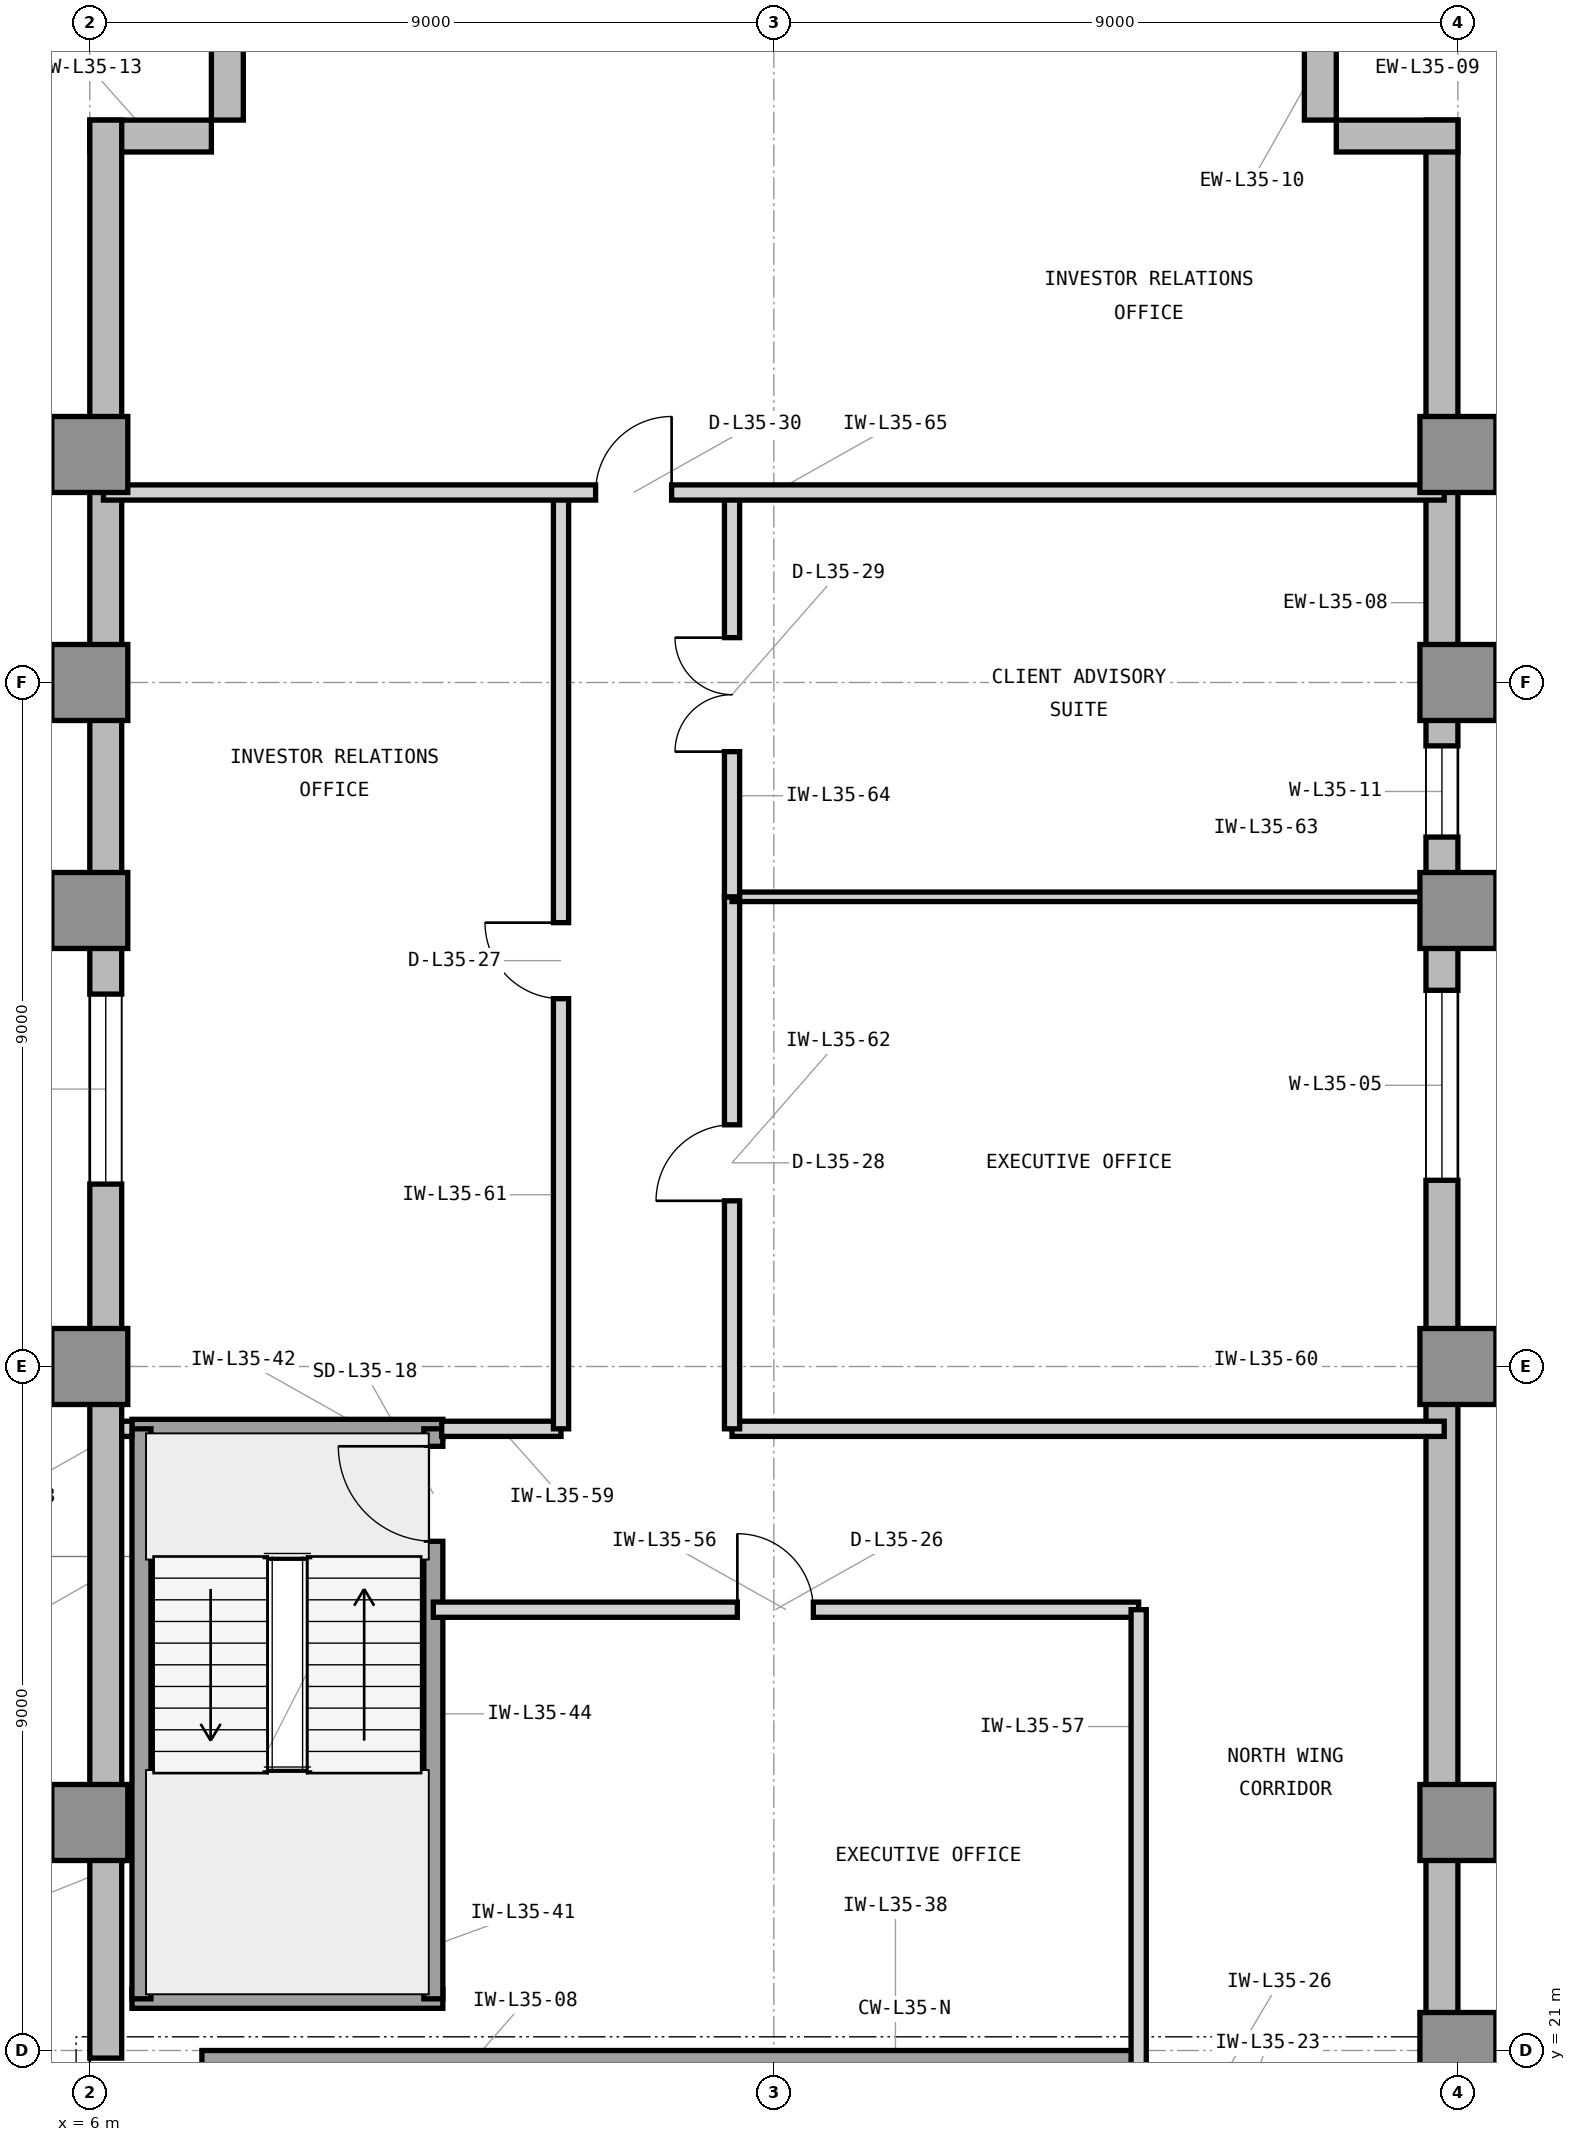
"""IFC4 building model, lengths in metres.
Left out: names, types, materials, properties, quantities, classifications, styles, units other than length and angle.
Written with IfcOpenShell. Run it as: python <this file> out.ifc"""

import sys

from ifc_helpers import new_model, si_unit, direction, frame, frame_2d, origin, origin_2d, place, context, subcontext, project, spatial, rectangle, extrude, element, fill, save


model = new_model("IFC4")
c1 = context("Model", 3, precision=1e-05, world=origin(), true_north=direction((0.0, 1.0)))
c2 = subcontext(c1, "Body", "Model", "MODEL_VIEW")
j1 = project(units=[si_unit("LENGTHUNIT", "METRE"), si_unit("PLANEANGLEUNIT", "RADIAN")], contexts=[c1])
p1 = place(None, origin())
s1 = spatial("IfcSite", under=j1, at=p1, CompositionType="ELEMENT")
p2 = place(p1, origin())
s2 = spatial("IfcBuilding", under=s1, at=p2, CompositionType="ELEMENT")
p3 = place(p2, frame((0.0, 0.0, 147.9)))
s3 = spatial("IfcBuildingStorey", under=s2, at=p3, CompositionType="ELEMENT", Elevation=147.9)
p4 = place(p3, frame((7.475, 20.65, 0.0), z_axis=(0.0, 0.0, 1.0), x_axis=(1.0, 0.0, 0.0)))
e1 = element("IfcWall", 1, at=p4, inside=s3, PredefinedType="SHEAR", context=c2, shape_type="SweptSolid", body=[
    extrude(rectangle(XDim=12.325, YDim=0.7, at=frame_2d((6.163, 0.0))), origin(), (0.0, 0.0, 1.0), 3.9),
])
for number, where, z_axis, x_axis in (
    (2, (24.0, 21.0, 0.0), (0.0, 0.0, 1.0), (1.0, 0.0, 0.0)),
    (3, (6.0, 24.0, 0.0), (0.0, 0.0, 1.0), (1.0, 0.0, 0.0)),
    (4, (24.0, 24.0, 0.0), (0.0, 0.0, 1.0), (1.0, 0.0, 0.0)),
    (5, (6.0, 30.0, 0.0), (0.0, 0.0, 1.0), (1.0, 0.0, 0.0)),
    (6, (24.0, 30.0, 0.0), (0.0, 0.0, 1.0), (1.0, 0.0, 0.0)),
    (7, (6.0, 36.0, 0.0), (0.0, 0.0, 1.0), (1.0, 0.0, 0.0)),
    (8, (24.0, 36.0, 0.0), (0.0, 0.0, 1.0), (1.0, 0.0, 0.0)),
    (9, (6.0, 39.0, 0.0), (0.0, 0.0, 1.0), (1.0, 0.0, 0.0)),
    (10, (24.0, 39.0, 0.0), (0.0, 0.0, 1.0), (1.0, 0.0, 0.0)),
    (11, (6.0, 42.0, 0.0), (0.0, 0.0, 1.0), (1.0, 0.0, 0.0)),
    (12, (24.0, 42.0, 0.0), (0.0, 0.0, 1.0), (1.0, 0.0, 0.0)),
):
    element("IfcColumn", number, at=place(p3, frame(where, z_axis=z_axis, x_axis=x_axis)), inside=s3, PredefinedType="COLUMN", context=c2, shape_type="SweptSolid", body=[
        extrude(rectangle(XDim=1.0, YDim=1.0, at=origin_2d()), origin(), (0.0, 0.0, 1.0), 3.9),
    ])
p5 = place(p3, frame((58.4, 20.79, 0.0), z_axis=(0.0, 0.0, 1.0), x_axis=(-1.0, 0.0, 0.0)))
e13 = element("IfcWall", 13, at=p5, inside=s3, PredefinedType="STANDARD", context=c2, shape_type="SweptSolid", body=[
    extrude(rectangle(XDim=34.4, YDim=0.42, at=frame_2d((17.2, 0.0))), origin(), (0.0, 0.0, 1.0), 3.7),
])
p6 = place(p5, frame((20.864, 0.0, 0.85)))
e14 = element("IfcOpeningElement", 14, at=p6, cuts=e13, PredefinedType="OPENING", context=c2, shape_type="SweptSolid", body=[
    extrude(rectangle(XDim=2.5, YDim=2.25, at=frame_2d((1.25, 1.125))), frame((0.0, 0.22, 0.0), z_axis=(0.0, -1.0, 0.0), x_axis=(1.0, 0.0, 0.0)), (0.0, 0.0, 1.0), 0.44),
])
p7 = place(p5, frame((32.222, 0.0, 0.85)))
e15 = element("IfcOpeningElement", 15, at=p7, cuts=e13, PredefinedType="OPENING", context=c2, shape_type="SweptSolid", body=[
    extrude(rectangle(XDim=1.2, YDim=2.25, at=frame_2d((0.6, 1.125))), frame((0.0, 0.22, 0.0), z_axis=(0.0, -1.0, 0.0), x_axis=(1.0, 0.0, 0.0)), (0.0, 0.0, 1.0), 0.44),
])
p8 = place(p5, frame((11.386, 0.0, 0.85)))
e16 = element("IfcOpeningElement", 16, at=p8, cuts=e13, PredefinedType="OPENING", context=c2, shape_type="SweptSolid", body=[
    extrude(rectangle(XDim=2.5, YDim=2.25, at=frame_2d((1.25, 1.125))), frame((0.0, 0.22, 0.0), z_axis=(0.0, -1.0, 0.0), x_axis=(1.0, 0.0, 0.0)), (0.0, 0.0, 1.0), 0.44),
])
p9 = place(p3, frame((23.79, 21.0, 0.0), z_axis=(0.0, 0.0, 1.0), x_axis=(0.0, 1.0, 0.0)))
e17 = element("IfcWall", 17, at=p9, inside=s3, PredefinedType="STANDARD", context=c2, shape_type="SweptSolid", body=[
    extrude(rectangle(XDim=25.4, YDim=0.42, at=frame_2d((12.7, 0.0))), origin(), (0.0, 0.0, 1.0), 3.7),
])
p10 = place(p9, frame((11.45, 0.0, 0.85)))
e18 = element("IfcOpeningElement", 18, at=p10, cuts=e17, PredefinedType="OPENING", context=c2, shape_type="SweptSolid", body=[
    extrude(rectangle(XDim=2.5, YDim=2.25, at=frame_2d((1.25, 1.125))), frame((0.0, 0.22, 0.0), z_axis=(0.0, -1.0, 0.0), x_axis=(1.0, 0.0, 0.0)), (0.0, 0.0, 1.0), 0.44),
])
p11 = place(p9, frame((15.966, 0.0, 0.85)))
e19 = element("IfcOpeningElement", 19, at=p11, cuts=e17, PredefinedType="OPENING", context=c2, shape_type="SweptSolid", body=[
    extrude(rectangle(XDim=1.2, YDim=2.25, at=frame_2d((0.6, 1.125))), frame((0.0, 0.22, 0.0), z_axis=(0.0, -1.0, 0.0), x_axis=(1.0, 0.0, 0.0)), (0.0, 0.0, 1.0), 0.44),
])
for number, where, z_axis, x_axis in (
    (20, (24.0, 46.19, 0.0), (0.0, 0.0, 1.0), (-1.0, 0.0, 0.0)),
    (21, (22.19, 46.4, 0.0), (0.0, 0.0, 1.0), (0.0, 1.0, 0.0)),
    (22, (7.81, 48.0, 0.0), (0.0, 0.0, 1.0), (0.0, -1.0, 0.0)),
    (23, (7.6, 46.19, 0.0), (0.0, 0.0, 1.0), (-1.0, 0.0, 0.0)),
):
    element("IfcWall", number, at=place(p3, frame(where, z_axis=z_axis, x_axis=x_axis)), inside=s3, PredefinedType="STANDARD", context=c2, shape_type="SweptSolid", body=[
        extrude(rectangle(XDim=1.6, YDim=0.42, at=frame_2d((0.8, 0.0))), origin(), (0.0, 0.0, 1.0), 3.7),
    ])
p12 = place(p3, frame((6.21, 46.4, 0.0), z_axis=(0.0, 0.0, 1.0), x_axis=(0.0, -1.0, 0.0)))
e24 = element("IfcWall", 24, at=p12, inside=s3, PredefinedType="STANDARD", context=c2, shape_type="SweptSolid", body=[
    extrude(rectangle(XDim=25.5, YDim=0.42, at=frame_2d((12.75, 0.0))), origin(), (0.0, 0.0, 1.0), 3.7),
])
p13 = place(p12, frame((11.5, 0.0, 0.85)))
e25 = element("IfcOpeningElement", 25, at=p13, cuts=e24, PredefinedType="OPENING", context=c2, shape_type="SweptSolid", body=[
    extrude(rectangle(XDim=2.5, YDim=2.25, at=frame_2d((1.25, 1.125))), frame((0.0, 0.22, 0.0), z_axis=(0.0, -1.0, 0.0), x_axis=(1.0, 0.0, 0.0)), (0.0, 0.0, 1.0), 0.44),
])
for number, where, z_axis, x_axis in (
    (26, (6.555, 21.68, 0.0), (0.0, 0.0, 1.0), (1.0, 0.0, 0.0)),
    (27, (6.555, 29.18, 0.0), (0.0, 0.0, 1.0), (1.0, 0.0, 0.0)),
):
    element("IfcWall", number, at=place(p3, frame(where, z_axis=z_axis, x_axis=x_axis)), inside=s3, PredefinedType="SHEAR", context=c2, shape_type="SweptSolid", body=[
        extrude(rectangle(XDim=4.09, YDim=0.25, at=frame_2d((2.045, 0.0))), origin(), (0.0, 0.0, 1.0), 3.9),
    ])
p14 = place(p3, frame((6.68, 21.68, 0.0), z_axis=(0.0, 0.0, 1.0), x_axis=(0.0, 1.0, 0.0)))
e28 = element("IfcWall", 28, at=p14, inside=s3, PredefinedType="SHEAR", context=c2, shape_type="SweptSolid", body=[
    extrude(rectangle(XDim=7.5, YDim=0.25, at=frame_2d((3.75, 0.0))), origin(), (0.0, 0.0, 1.0), 3.9),
])
p15 = place(p3, frame((10.52, 21.68, 0.0), z_axis=(0.0, 0.0, 1.0), x_axis=(0.0, 1.0, 0.0)))
e29 = element("IfcWall", 29, at=p15, inside=s3, PredefinedType="SHEAR", context=c2, shape_type="SweptSolid", body=[
    extrude(rectangle(XDim=7.5, YDim=0.25, at=frame_2d((3.75, 0.0))), origin(), (0.0, 0.0, 1.0), 3.9),
])
p16 = place(p15, frame((6.02, 0.0, 0.0)))
e30 = element("IfcOpeningElement", 30, at=p16, cuts=e29, PredefinedType="OPENING", context=c2, shape_type="SweptSolid", body=[
    extrude(rectangle(XDim=1.25, YDim=2.2, at=frame_2d((0.625, 1.1))), frame((0.0, 0.135, 0.0), z_axis=(0.0, -1.0, 0.0), x_axis=(1.0, 0.0, 0.0)), (0.0, 0.0, 1.0), 0.27),
])
p17 = place(p3, frame((10.52, 26.8, 0.0), z_axis=(0.0, 0.0, 1.0), x_axis=(1.0, 0.0, 0.0)))
e31 = element("IfcWall", 31, at=p17, inside=s3, PredefinedType="PARTITIONING", context=c2, shape_type="SweptSolid", body=[
    extrude(rectangle(XDim=9.28, YDim=0.2, at=frame_2d((4.64, 0.0))), origin(), (0.0, 0.0, 1.0), 3.69),
])
p18 = place(p17, frame((4.0, 0.0, 0.0)))
e32 = element("IfcOpeningElement", 32, at=p18, cuts=e31, PredefinedType="OPENING", context=c2, shape_type="SweptSolid", body=[
    extrude(rectangle(XDim=1.0, YDim=2.15, at=frame_2d((0.5, 1.075))), frame((0.0, 0.11, 0.0), z_axis=(0.0, -1.0, 0.0), x_axis=(1.0, 0.0, 0.0)), (0.0, 0.0, 1.0), 0.22),
])
p19 = place(p3, frame((19.8, 20.65, 0.0), z_axis=(0.0, 0.0, 1.0), x_axis=(0.0, 1.0, 0.0)))
e33 = element("IfcWall", 33, at=p19, inside=s3, PredefinedType="PARTITIONING", context=c2, shape_type="SweptSolid", body=[
    extrude(rectangle(XDim=6.15, YDim=0.2, at=frame_2d((3.075, 0.0))), origin(), (0.0, 0.0, 1.0), 3.69),
])
p20 = place(p3, frame((6.42, 29.18, 0.0), z_axis=(0.0, 0.0, 1.0), x_axis=(1.0, 0.0, 0.0)))
e34 = element("IfcWall", 34, at=p20, inside=s3, PredefinedType="PARTITIONING", context=c2, shape_type="SweptSolid", body=[
    extrude(rectangle(XDim=0.135, YDim=0.2, at=frame_2d((0.067, 0.0))), origin(), (0.0, 0.0, 1.0), 3.69),
])
p21 = place(p3, frame((10.63, 29.18, 0.0), z_axis=(0.0, 0.0, 1.0), x_axis=(1.0, 0.0, 0.0)))
e35 = element("IfcWall", 35, at=p21, inside=s3, PredefinedType="PARTITIONING", context=c2, shape_type="SweptSolid", body=[
    extrude(rectangle(XDim=1.57, YDim=0.2, at=frame_2d((0.785, 0.0))), origin(), (0.0, 0.0, 1.0), 3.69),
])
p22 = place(p3, frame((14.45, 29.18, 0.0), z_axis=(0.0, 0.0, 1.0), x_axis=(1.0, 0.0, 0.0)))
e36 = element("IfcWall", 36, at=p22, inside=s3, PredefinedType="PARTITIONING", context=c2, shape_type="SweptSolid", body=[
    extrude(rectangle(XDim=9.37, YDim=0.2, at=frame_2d((4.685, 0.0))), origin(), (0.0, 0.0, 1.0), 3.69),
])
p23 = place(p3, frame((12.2, 29.18, 0.0), z_axis=(0.0, 0.0, 1.0), x_axis=(0.0, 1.0, 0.0)))
e37 = element("IfcWall", 37, at=p23, inside=s3, PredefinedType="PARTITIONING", context=c2, shape_type="SweptSolid", body=[
    extrude(rectangle(XDim=12.32, YDim=0.2, at=frame_2d((6.16, 0.0))), origin(), (0.0, 0.0, 1.0), 3.69),
])
p24 = place(p23, frame((5.66, 0.0, 0.0)))
e38 = element("IfcOpeningElement", 38, at=p24, cuts=e37, PredefinedType="OPENING", context=c2, shape_type="SweptSolid", body=[
    extrude(rectangle(XDim=1.0, YDim=2.15, at=frame_2d((0.5, 1.075))), frame((0.0, 0.11, 0.0), z_axis=(0.0, -1.0, 0.0), x_axis=(1.0, 0.0, 0.0)), (0.0, 0.0, 1.0), 0.22),
])
p25 = place(p3, frame((14.45, 29.18, 0.0), z_axis=(0.0, 0.0, 1.0), x_axis=(0.0, 1.0, 0.0)))
e39 = element("IfcWall", 39, at=p25, inside=s3, PredefinedType="PARTITIONING", context=c2, shape_type="SweptSolid", body=[
    extrude(rectangle(XDim=7.0, YDim=0.2, at=frame_2d((3.5, 0.0))), origin(), (0.0, 0.0, 1.0), 3.69),
])
p26 = place(p25, frame((3.0, 0.0, 0.0)))
e40 = element("IfcOpeningElement", 40, at=p26, cuts=e39, PredefinedType="OPENING", context=c2, shape_type="SweptSolid", body=[
    extrude(rectangle(XDim=1.0, YDim=2.15, at=frame_2d((0.5, 1.075))), frame((0.0, 0.11, 0.0), z_axis=(0.0, -1.0, 0.0), x_axis=(1.0, 0.0, 0.0)), (0.0, 0.0, 1.0), 0.22),
])
p27 = place(p3, frame((14.45, 36.18, 0.0), z_axis=(0.0, 0.0, 1.0), x_axis=(1.0, 0.0, 0.0)))
e41 = element("IfcWall", 41, at=p27, inside=s3, PredefinedType="PARTITIONING", context=c2, shape_type="SweptSolid", body=[
    extrude(rectangle(XDim=9.37, YDim=0.125, at=frame_2d((4.685, 0.0))), origin(), (0.0, 0.0, 1.0), 3.69),
])
p28 = place(p3, frame((14.45, 36.18, 0.0), z_axis=(0.0, 0.0, 1.0), x_axis=(0.0, 1.0, 0.0)))
e42 = element("IfcWall", 42, at=p28, inside=s3, PredefinedType="PARTITIONING", context=c2, shape_type="SweptSolid", body=[
    extrude(rectangle(XDim=5.32, YDim=0.2, at=frame_2d((2.66, 0.0))), origin(), (0.0, 0.0, 1.0), 3.69),
])
p29 = place(p28, frame((1.91, 0.0, 0.0)))
e43 = element("IfcOpeningElement", 43, at=p29, cuts=e42, PredefinedType="OPENING", context=c2, shape_type="SweptSolid", body=[
    extrude(rectangle(XDim=1.5, YDim=2.3, at=frame_2d((0.75, 1.15))), frame((0.0, 0.11, 0.0), z_axis=(0.0, -1.0, 0.0), x_axis=(1.0, 0.0, 0.0)), (0.0, 0.0, 1.0), 0.22),
])
p30 = place(p3, frame((6.18, 41.5, 0.0), z_axis=(0.0, 0.0, 1.0), x_axis=(1.0, 0.0, 0.0)))
e44 = element("IfcWall", 44, at=p30, inside=s3, PredefinedType="PARTITIONING", context=c2, shape_type="SweptSolid", body=[
    extrude(rectangle(XDim=17.64, YDim=0.2, at=frame_2d((8.82, 0.0))), origin(), (0.0, 0.0, 1.0), 3.69),
])
p31 = place(p30, frame((6.475, 0.0, 0.0)))
e45 = element("IfcOpeningElement", 45, at=p31, cuts=e44, PredefinedType="OPENING", context=c2, shape_type="SweptSolid", body=[
    extrude(rectangle(XDim=1.0, YDim=2.15, at=frame_2d((0.5, 1.075))), frame((0.0, 0.11, 0.0), z_axis=(0.0, -1.0, 0.0), x_axis=(1.0, 0.0, 0.0)), (0.0, 0.0, 1.0), 0.22),
])
p32 = place(p10, origin())
e46 = element("IfcWindow", 46, at=p32, inside=s3, PartitioningType="SINGLE_PANEL", PredefinedType="WINDOW", context=c2, shape_type="SweptSolid", body=[
    extrude(rectangle(XDim=2.5, YDim=2.25, at=frame_2d((1.25, 1.125))), frame((0.0, 0.11, 0.0), z_axis=(0.0, -1.0, 0.0), x_axis=(1.0, 0.0, 0.0)), (0.0, 0.0, 1.0), 0.06),
])
fill(e18, e46)
p33 = place(p13, origin())
e47 = element("IfcWindow", 47, at=p33, inside=s3, PartitioningType="SINGLE_PANEL", PredefinedType="WINDOW", context=c2, shape_type="SweptSolid", body=[
    extrude(rectangle(XDim=2.5, YDim=2.25, at=frame_2d((1.25, 1.125))), frame((0.0, 0.11, 0.0), z_axis=(0.0, -1.0, 0.0), x_axis=(1.0, 0.0, 0.0)), (0.0, 0.0, 1.0), 0.06),
])
fill(e25, e47)
p34 = place(p16, origin())
e48 = element("IfcDoor", 48, at=p34, inside=s3, OperationType="SINGLE_SWING_RIGHT", PredefinedType="DOOR", context=c2, shape_type="SweptSolid", body=[
    extrude(rectangle(XDim=1.25, YDim=2.2, at=frame_2d((0.625, 1.1))), frame((0.0, 0.025, 0.0), z_axis=(0.0, -1.0, 0.0), x_axis=(1.0, 0.0, 0.0)), (0.0, 0.0, 1.0), 0.05),
])
fill(e30, e48)
p35 = place(p18, origin())
e49 = element("IfcDoor", 49, at=p35, inside=s3, OperationType="SINGLE_SWING_LEFT", PredefinedType="DOOR", context=c2, shape_type="SweptSolid", body=[
    extrude(rectangle(XDim=1.0, YDim=2.15, at=frame_2d((0.5, 1.075))), frame((0.0, 0.025, 0.0), z_axis=(0.0, -1.0, 0.0), x_axis=(1.0, 0.0, 0.0)), (0.0, 0.0, 1.0), 0.05),
])
fill(e32, e49)
p36 = place(p24, origin())
e50 = element("IfcDoor", 50, at=p36, inside=s3, OperationType="SINGLE_SWING_RIGHT", PredefinedType="DOOR", context=c2, shape_type="SweptSolid", body=[
    extrude(rectangle(XDim=1.0, YDim=2.15, at=frame_2d((0.5, 1.075))), frame((0.0, 0.025, 0.0), z_axis=(0.0, -1.0, 0.0), x_axis=(1.0, 0.0, 0.0)), (0.0, 0.0, 1.0), 0.05),
])
fill(e38, e50)
p37 = place(p26, origin())
e51 = element("IfcDoor", 51, at=p37, inside=s3, OperationType="SINGLE_SWING_LEFT", PredefinedType="DOOR", context=c2, shape_type="SweptSolid", body=[
    extrude(rectangle(XDim=1.0, YDim=2.15, at=frame_2d((0.5, 1.075))), frame((0.0, 0.025, 0.0), z_axis=(0.0, -1.0, 0.0), x_axis=(1.0, 0.0, 0.0)), (0.0, 0.0, 1.0), 0.05),
])
fill(e40, e51)
p38 = place(p29, origin())
e52 = element("IfcDoor", 52, at=p38, inside=s3, OperationType="DOUBLE_DOOR_SINGLE_SWING", PredefinedType="DOOR", context=c2, shape_type="SweptSolid", body=[
    extrude(rectangle(XDim=1.5, YDim=2.3, at=frame_2d((0.75, 1.15))), frame((0.0, 0.025, 0.0), z_axis=(0.0, -1.0, 0.0), x_axis=(1.0, 0.0, 0.0)), (0.0, 0.0, 1.0), 0.05),
])
fill(e43, e52)
p39 = place(p31, origin())
e53 = element("IfcDoor", 53, at=p39, inside=s3, OperationType="SINGLE_SWING_RIGHT", PredefinedType="DOOR", context=c2, shape_type="SweptSolid", body=[
    extrude(rectangle(XDim=1.0, YDim=2.15, at=frame_2d((0.5, 1.075))), frame((0.0, 0.025, 0.0), z_axis=(0.0, -1.0, 0.0), x_axis=(1.0, 0.0, 0.0)), (0.0, 0.0, 1.0), 0.05),
])
fill(e45, e53)
p40 = place(p11, origin())
e54 = element("IfcWindow", 54, at=p40, inside=s3, PartitioningType="SINGLE_PANEL", PredefinedType="WINDOW", context=c2, shape_type="SweptSolid", body=[
    extrude(rectangle(XDim=1.2, YDim=2.25, at=frame_2d((0.6, 1.125))), frame((0.0, 0.11, 0.0), z_axis=(0.0, -1.0, 0.0), x_axis=(1.0, 0.0, 0.0)), (0.0, 0.0, 1.0), 0.06),
])
fill(e19, e54)
save(model, sys.argv[1])
